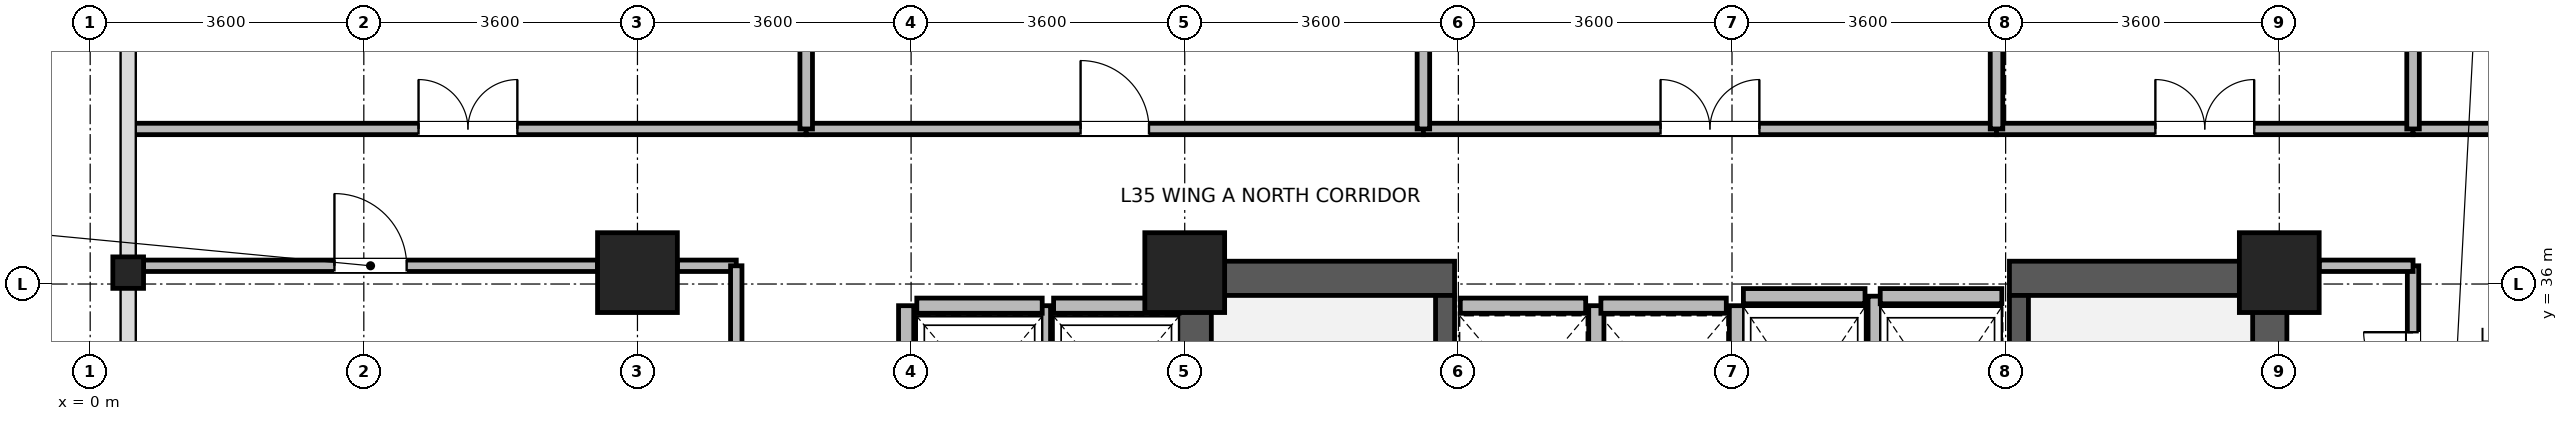
"""IFC4 building model, lengths in metres.
Left out: names, types, materials, properties, quantities, classifications, styles, units other than length and angle.
Written with IfcOpenShell. Run it as: python <this file> out.ifc"""

import sys

from ifc_helpers import new_model, si_unit, direction, frame, frame_2d, origin, origin_2d, place, context, subcontext, project, spatial, rectangle, i_section, extrude, source, transform, mapped, element, fill, save


model = new_model("IFC4")
c1 = context("Model", 3, precision=1e-05, world=origin(), true_north=direction((0.0, 1.0)))
c2 = subcontext(c1, "Body", "Model", "MODEL_VIEW")
j1 = project(units=[si_unit("LENGTHUNIT", "METRE"), si_unit("PLANEANGLEUNIT", "RADIAN")], contexts=[c1])
p1 = place(None, origin())
s1 = spatial("IfcSite", under=j1, at=p1, CompositionType="ELEMENT")
p2 = place(p1, origin())
s2 = spatial("IfcBuilding", under=s1, at=p2, CompositionType="ELEMENT")
p3 = place(p2, frame((0.0, 0.0, 140.2)))
s3 = spatial("IfcBuildingStorey", under=s2, at=p3, CompositionType="ELEMENT", Elevation=140.2)
for number, where, z_axis, x_axis in (
    (1, (14.525, 28.4, 0.0), (0.0, 0.0, 1.0), (0.0, 1.0, 0.0)),
    (2, (28.675, 28.4, 0.0), (0.0, 0.0, 1.0), (0.0, 1.0, 0.0)),
):
    element("IfcWall", number, at=place(p3, frame(where, z_axis=z_axis, x_axis=x_axis)), inside=s3, PredefinedType="SHEAR", context=c2, shape_type="SweptSolid", body=[
        extrude(rectangle(XDim=7.9, YDim=0.45, at=frame_2d((3.95, 0.0))), origin(), (0.0, 0.0, 1.0), 3.46),
    ])
for number, where, z_axis, x_axis in (
    (3, (14.75, 36.075, 0.0), (0.0, 0.0, 1.0), (1.0, 0.0, 0.0)),
    (4, (25.25, 36.075, 0.0), (0.0, 0.0, 1.0), (1.0, 0.0, 0.0)),
):
    element("IfcWall", number, at=place(p3, frame(where, z_axis=z_axis, x_axis=x_axis)), inside=s3, PredefinedType="SHEAR", context=c2, shape_type="SweptSolid", body=[
        extrude(rectangle(XDim=3.2, YDim=0.45, at=frame_2d((1.6, 0.0))), origin(), (0.0, 0.0, 1.0), 3.46),
    ])
p4 = place(p3, frame((17.825, 28.85, 0.0), z_axis=(0.0, 0.0, 1.0), x_axis=(0.0, 1.0, 0.0)))
e5 = element("IfcWall", 5, at=p4, inside=s3, PredefinedType="SHEAR", context=c2, shape_type="SweptSolid", body=[
    extrude(rectangle(XDim=7.0, YDim=0.25, at=frame_2d((3.5, 0.0))), origin(), (0.0, 0.0, 1.0), 3.46),
])
p5 = place(p4, frame((0.15, 0.0, 0.0)))
e6 = element("IfcOpeningElement", 6, at=p5, cuts=e5, PredefinedType="OPENING", context=c2, shape_type="SweptSolid", body=[
    extrude(rectangle(XDim=1.1, YDim=2.08, at=frame_2d((0.55, 1.04))), frame((0.0, 0.135, 0.0), z_axis=(0.0, -1.0, 0.0), x_axis=(1.0, 0.0, 0.0)), (0.0, 0.0, 1.0), 0.27),
])
p6 = place(p3, frame((25.375, 28.85, 0.0), z_axis=(0.0, 0.0, 1.0), x_axis=(0.0, 1.0, 0.0)))
e7 = element("IfcWall", 7, at=p6, inside=s3, PredefinedType="SHEAR", context=c2, shape_type="SweptSolid", body=[
    extrude(rectangle(XDim=7.0, YDim=0.25, at=frame_2d((3.5, 0.0))), origin(), (0.0, 0.0, 1.0), 3.46),
])
p7 = place(p6, frame((0.15, 0.0, 0.0)))
e8 = element("IfcOpeningElement", 8, at=p7, cuts=e7, PredefinedType="OPENING", context=c2, shape_type="SweptSolid", body=[
    extrude(rectangle(XDim=1.1, YDim=2.08, at=frame_2d((0.55, 1.04))), frame((0.0, 0.135, 0.0), z_axis=(0.0, -1.0, 0.0), x_axis=(1.0, 0.0, 0.0)), (0.0, 0.0, 1.0), 0.27),
])
m1 = source(origin(), c2, "Body", "SweptSolid", [
    extrude(rectangle(XDim=1.05, YDim=1.05, at=origin_2d()), origin(), (0.0, 0.0, 1.0), 3.7),
])
for number, where, z_axis, x_axis in (
    (9, (7.2, 36.15, 0.0), (0.0, 0.0, 1.0), (1.0, 0.0, 0.0)),
    (10, (14.4, 36.15, 0.0), (0.0, 0.0, 1.0), (1.0, 0.0, 0.0)),
    (11, (28.8, 36.15, 0.0), (0.0, 0.0, 1.0), (1.0, 0.0, 0.0)),
):
    element("IfcColumn", number, at=place(p3, frame(where, z_axis=z_axis, x_axis=x_axis)), inside=s3, PredefinedType="COLUMN", context=c2, shape_type="MappedRepresentation", body=[
        mapped(m1, transform((0.0, 0.0, 0.0), x_axis=(1.0, 0.0, 0.0), y_axis=(0.0, 1.0, 0.0), z_axis=(0.0, 0.0, 1.0), scale=1.0)),
    ])
m2 = source(origin(), c2, "Body", "SweptSolid", [
    extrude(i_section(OverallWidth=0.404, OverallDepth=0.414, WebThickness=0.021, FlangeThickness=0.028, FilletRadius=0.015, at=origin_2d()), origin(), (0.0, 0.0, 1.0), 3.7),
])
p8 = place(p3, frame((0.5, 36.15, 0.0), z_axis=(0.0, 0.0, 1.0), x_axis=(1.0, 0.0, 0.0)))
e12 = element("IfcColumn", 12, at=p8, inside=s3, PredefinedType="COLUMN", context=c2, shape_type="MappedRepresentation", body=[
    mapped(m2, transform((0.0, 0.0, 0.0), x_axis=(1.0, 0.0, 0.0), y_axis=(0.0, 1.0, 0.0), z_axis=(0.0, 0.0, 1.0), scale=1.0)),
])
p9 = place(p3, frame((18.025, 35.715, 0.0), z_axis=(0.0, 0.0, 1.0), x_axis=(1.0, 0.0, 0.0)))
e13 = element("IfcWall", 13, at=p9, inside=s3, PredefinedType="PARTITIONING", context=c2, shape_type="SweptSolid", body=[
    extrude(rectangle(XDim=1.65, YDim=0.2, at=frame_2d((0.825, 0.0))), origin(), (0.0, 0.0, 1.0), 2.44),
])
p10 = place(p3, frame((19.815, 33.485, 0.0), z_axis=(0.0, 0.0, 1.0), x_axis=(0.0, 1.0, 0.0)))
e14 = element("IfcWall", 14, at=p10, inside=s3, PredefinedType="PARTITIONING", context=c2, shape_type="SweptSolid", body=[
    extrude(rectangle(XDim=2.23, YDim=0.2, at=frame_2d((1.115, 0.0))), origin(), (0.0, 0.0, 1.0), 3.44),
])
p11 = place(p3, frame((19.875, 35.715, 0.0), z_axis=(0.0, 0.0, 1.0), x_axis=(1.0, 0.0, 0.0)))
e15 = element("IfcWall", 15, at=p11, inside=s3, PredefinedType="PARTITIONING", context=c2, shape_type="SweptSolid", body=[
    extrude(rectangle(XDim=1.65, YDim=0.2, at=frame_2d((0.825, 0.0))), origin(), (0.0, 0.0, 1.0), 2.44),
])
p12 = place(p3, frame((21.665, 33.485, 0.0), z_axis=(0.0, 0.0, 1.0), x_axis=(0.0, 1.0, 0.0)))
e16 = element("IfcWall", 16, at=p12, inside=s3, PredefinedType="PARTITIONING", context=c2, shape_type="SweptSolid", body=[
    extrude(rectangle(XDim=2.23, YDim=0.2, at=frame_2d((1.115, 0.0))), origin(), (0.0, 0.0, 1.0), 3.44),
])
p13 = place(p3, frame((12.675, 35.715, 0.0), z_axis=(0.0, 0.0, 1.0), x_axis=(1.0, 0.0, 0.0)))
e17 = element("IfcWall", 17, at=p13, inside=s3, PredefinedType="PARTITIONING", context=c2, shape_type="SweptSolid", body=[
    extrude(rectangle(XDim=1.65, YDim=0.2, at=frame_2d((0.825, 0.0))), origin(), (0.0, 0.0, 1.0), 3.44),
])
p14 = place(p3, frame((12.535, 33.485, 0.0), z_axis=(0.0, 0.0, 1.0), x_axis=(0.0, 1.0, 0.0)))
e18 = element("IfcWall", 18, at=p14, inside=s3, PredefinedType="PARTITIONING", context=c2, shape_type="SweptSolid", body=[
    extrude(rectangle(XDim=2.23, YDim=0.2, at=frame_2d((1.115, 0.0))), origin(), (0.0, 0.0, 1.0), 3.44),
])
p15 = place(p3, frame((10.875, 35.715, 0.0), z_axis=(0.0, 0.0, 1.0), x_axis=(1.0, 0.0, 0.0)))
e19 = element("IfcWall", 19, at=p15, inside=s3, PredefinedType="PARTITIONING", context=c2, shape_type="SweptSolid", body=[
    extrude(rectangle(XDim=1.65, YDim=0.2, at=frame_2d((0.825, 0.0))), origin(), (0.0, 0.0, 1.0), 3.44),
])
p16 = place(p3, frame((10.735, 33.485, 0.0), z_axis=(0.0, 0.0, 1.0), x_axis=(0.0, 1.0, 0.0)))
e20 = element("IfcWall", 20, at=p16, inside=s3, PredefinedType="PARTITIONING", context=c2, shape_type="SweptSolid", body=[
    extrude(rectangle(XDim=2.23, YDim=0.2, at=frame_2d((1.115, 0.0))), origin(), (0.0, 0.0, 1.0), 3.44),
])
p17 = place(p3, frame((21.75, 35.84, 0.0), z_axis=(0.0, 0.0, 1.0), x_axis=(1.0, 0.0, 0.0)))
e21 = element("IfcWall", 21, at=p17, inside=s3, PredefinedType="PARTITIONING", context=c2, shape_type="SweptSolid", body=[
    extrude(rectangle(XDim=1.6, YDim=0.2, at=frame_2d((0.8, 0.0))), origin(), (0.0, 0.0, 1.0), 2.44),
])
p18 = place(p3, frame((23.49, 33.16, 0.0), z_axis=(0.0, 0.0, 1.0), x_axis=(0.0, 1.0, 0.0)))
e22 = element("IfcWall", 22, at=p18, inside=s3, PredefinedType="PARTITIONING", context=c2, shape_type="SweptSolid", body=[
    extrude(rectangle(XDim=2.68, YDim=0.2, at=frame_2d((1.34, 0.0))), origin(), (0.0, 0.0, 1.0), 3.44),
])
p19 = place(p3, frame((23.55, 35.84, 0.0), z_axis=(0.0, 0.0, 1.0), x_axis=(1.0, 0.0, 0.0)))
e23 = element("IfcWall", 23, at=p19, inside=s3, PredefinedType="PARTITIONING", context=c2, shape_type="SweptSolid", body=[
    extrude(rectangle(XDim=1.6, YDim=0.2, at=frame_2d((0.8, 0.0))), origin(), (0.0, 0.0, 1.0), 2.44),
])
p20 = place(p3, frame((0.52, 38.04, 0.0), z_axis=(0.0, 0.0, 1.0), x_axis=(1.0, 0.0, 0.0)))
e24 = element("IfcWall", 24, at=p20, inside=s3, PredefinedType="PARTITIONING", context=c2, shape_type="SweptSolid", body=[
    extrude(rectangle(XDim=8.9, YDim=0.15, at=frame_2d((4.45, 0.0))), origin(), (0.0, 0.0, 1.0), 3.44),
])
p21 = place(p20, frame((3.8, 0.0, 0.0)))
e25 = element("IfcOpeningElement", 25, at=p21, cuts=e24, PredefinedType="OPENING", context=c2, shape_type="SweptSolid", body=[
    extrude(rectangle(XDim=1.3, YDim=2.12, at=frame_2d((0.65, 1.06))), frame((0.0, 0.085, 0.0), z_axis=(0.0, -1.0, 0.0), x_axis=(1.0, 0.0, 0.0)), (0.0, 0.0, 1.0), 0.17),
])
p22 = place(p3, frame((9.42, 38.04, 0.0), z_axis=(0.0, 0.0, 1.0), x_axis=(1.0, 0.0, 0.0)))
e26 = element("IfcWall", 26, at=p22, inside=s3, PredefinedType="PARTITIONING", context=c2, shape_type="SweptSolid", body=[
    extrude(rectangle(XDim=8.12, YDim=0.15, at=frame_2d((4.06, 0.0))), origin(), (0.0, 0.0, 1.0), 3.44),
])
p23 = place(p22, frame((3.61, 0.0, 0.0)))
e27 = element("IfcOpeningElement", 27, at=p23, cuts=e26, PredefinedType="OPENING", context=c2, shape_type="SweptSolid", body=[
    extrude(rectangle(XDim=0.9, YDim=2.08, at=frame_2d((0.45, 1.04))), frame((0.0, 0.085, 0.0), z_axis=(0.0, -1.0, 0.0), x_axis=(1.0, 0.0, 0.0)), (0.0, 0.0, 1.0), 0.17),
])
p24 = place(p3, frame((0.702, 36.24, 0.0), z_axis=(0.0, 0.0, 1.0), x_axis=(1.0, 0.0, 0.0)))
e28 = element("IfcWall", 28, at=p24, inside=s3, PredefinedType="PARTITIONING", context=c2, shape_type="SweptSolid", body=[
    extrude(rectangle(XDim=5.973, YDim=0.15, at=frame_2d((2.987, 0.0))), origin(), (0.0, 0.0, 1.0), 2.84),
])
p25 = place(p24, frame((2.511, 0.0, 0.0)))
e29 = element("IfcOpeningElement", 29, at=p25, cuts=e28, PredefinedType="OPENING", context=c2, shape_type="SweptSolid", body=[
    extrude(rectangle(XDim=0.95, YDim=2.1, at=frame_2d((0.475, 1.05))), frame((0.0, 0.085, 0.0), z_axis=(0.0, -1.0, 0.0), x_axis=(1.0, 0.0, 0.0)), (0.0, 0.0, 1.0), 0.17),
])
p26 = place(p3, frame((7.725, 36.24, 0.0), z_axis=(0.0, 0.0, 1.0), x_axis=(1.0, 0.0, 0.0)))
e30 = element("IfcWall", 30, at=p26, inside=s3, PredefinedType="PARTITIONING", context=c2, shape_type="SweptSolid", body=[
    extrude(rectangle(XDim=0.775, YDim=0.15, at=frame_2d((0.387, 0.0))), origin(), (0.0, 0.0, 1.0), 2.84),
])
p27 = place(p3, frame((17.54, 38.04, 0.0), z_axis=(0.0, 0.0, 1.0), x_axis=(1.0, 0.0, 0.0)))
e31 = element("IfcWall", 31, at=p27, inside=s3, PredefinedType="PARTITIONING", context=c2, shape_type="SweptSolid", body=[
    extrude(rectangle(XDim=7.54, YDim=0.15, at=frame_2d((3.77, 0.0))), origin(), (0.0, 0.0, 1.0), 3.44),
])
p28 = place(p27, frame((3.12, 0.0, 0.0)))
e32 = element("IfcOpeningElement", 32, at=p28, cuts=e31, PredefinedType="OPENING", context=c2, shape_type="SweptSolid", body=[
    extrude(rectangle(XDim=1.3, YDim=2.12, at=frame_2d((0.65, 1.06))), frame((0.0, 0.085, 0.0), z_axis=(0.0, -1.0, 0.0), x_axis=(1.0, 0.0, 0.0)), (0.0, 0.0, 1.0), 0.17),
])
p29 = place(p3, frame((25.08, 38.04, 0.0), z_axis=(0.0, 0.0, 1.0), x_axis=(1.0, 0.0, 0.0)))
e33 = element("IfcWall", 33, at=p29, inside=s3, PredefinedType="PARTITIONING", context=c2, shape_type="SweptSolid", body=[
    extrude(rectangle(XDim=5.48, YDim=0.15, at=frame_2d((2.74, 0.0))), origin(), (0.0, 0.0, 1.0), 3.44),
])
p30 = place(p29, frame((2.09, 0.0, 0.0)))
e34 = element("IfcOpeningElement", 34, at=p30, cuts=e33, PredefinedType="OPENING", context=c2, shape_type="SweptSolid", body=[
    extrude(rectangle(XDim=1.3, YDim=2.12, at=frame_2d((0.65, 1.06))), frame((0.0, 0.085, 0.0), z_axis=(0.0, -1.0, 0.0), x_axis=(1.0, 0.0, 0.0)), (0.0, 0.0, 1.0), 0.17),
])
p31 = place(p3, frame((30.56, 38.04, 0.0), z_axis=(0.0, 0.0, 1.0), x_axis=(1.0, 0.0, 0.0)))
e35 = element("IfcWall", 35, at=p31, inside=s3, PredefinedType="PARTITIONING", context=c2, shape_type="SweptSolid", body=[
    extrude(rectangle(XDim=4.8, YDim=0.15, at=frame_2d((2.4, 0.0))), origin(), (0.0, 0.0, 1.0), 3.44),
])
p32 = place(p31, frame((1.75, 0.0, 0.0)))
e36 = element("IfcOpeningElement", 36, at=p32, cuts=e35, PredefinedType="OPENING", context=c2, shape_type="SweptSolid", body=[
    extrude(rectangle(XDim=1.3, YDim=2.12, at=frame_2d((0.65, 1.06))), frame((0.0, 0.085, 0.0), z_axis=(0.0, -1.0, 0.0), x_axis=(1.0, 0.0, 0.0)), (0.0, 0.0, 1.0), 0.17),
])
p33 = place(p3, frame((8.5, 32.4, 0.0), z_axis=(0.0, 0.0, 1.0), x_axis=(0.0, 1.0, 0.0)))
e37 = element("IfcWall", 37, at=p33, inside=s3, PredefinedType="PARTITIONING", context=c2, shape_type="SweptSolid", body=[
    extrude(rectangle(XDim=3.84, YDim=0.15, at=frame_2d((1.92, 0.0))), origin(), (0.0, 0.0, 1.0), 3.44),
])
p34 = place(p3, frame((30.56, 33.7, 0.0), z_axis=(0.0, 0.0, 1.0), x_axis=(0.0, 1.0, 0.0)))
e38 = element("IfcWall", 38, at=p34, inside=s3, PredefinedType="PARTITIONING", context=c2, shape_type="SweptSolid", body=[
    extrude(rectangle(XDim=2.54, YDim=0.15, at=frame_2d((1.27, 0.0))), origin(), (0.0, 0.0, 1.0), 3.44),
])
p35 = place(p34, frame((0.366, 0.0, 0.0)))
e39 = element("IfcOpeningElement", 39, at=p35, cuts=e38, PredefinedType="OPENING", context=c2, shape_type="SweptSolid", body=[
    extrude(rectangle(XDim=1.3, YDim=2.12, at=frame_2d((0.65, 1.06))), frame((0.0, 0.085, 0.0), z_axis=(0.0, -1.0, 0.0), x_axis=(1.0, 0.0, 0.0)), (0.0, 0.0, 1.0), 0.17),
])
p36 = place(p3, frame((29.325, 36.24, 0.0), z_axis=(0.0, 0.0, 1.0), x_axis=(1.0, 0.0, 0.0)))
e40 = element("IfcWall", 40, at=p36, inside=s3, PredefinedType="PARTITIONING", context=c2, shape_type="SweptSolid", body=[
    extrude(rectangle(XDim=1.235, YDim=0.15, at=frame_2d((0.618, 0.0))), origin(), (0.0, 0.0, 1.0), 2.84),
])
for number, where, z_axis, x_axis in (
    (41, (9.42, 38.04, 0.0), (0.0, 0.0, 1.0), (0.0, 1.0, 0.0)),
    (42, (17.54, 38.04, 0.0), (0.0, 0.0, 1.0), (0.0, 1.0, 0.0)),
):
    element("IfcWall", number, at=place(p3, frame(where, z_axis=z_axis, x_axis=x_axis)), inside=s3, PredefinedType="PARTITIONING", context=c2, shape_type="SweptSolid", body=[
        extrude(rectangle(XDim=5.028, YDim=0.165, at=frame_2d((2.514, 0.0))), origin(), (0.0, 0.0, 1.0), 3.44),
    ])
p37 = place(p3, frame((25.08, 38.04, 0.0), z_axis=(0.0, 0.0, 1.0), x_axis=(0.0, 1.0, 0.0)))
e43 = element("IfcWall", 43, at=p37, inside=s3, PredefinedType="PARTITIONING", context=c2, shape_type="SweptSolid", body=[
    extrude(rectangle(XDim=5.028, YDim=0.165, at=frame_2d((2.514, 0.0))), origin(), (0.0, 0.0, 1.0), 3.11),
])
p38 = place(p3, frame((30.56, 38.04, 0.0), z_axis=(0.0, 0.0, 1.0), x_axis=(0.0, 1.0, 0.0)))
e44 = element("IfcWall", 44, at=p38, inside=s3, PredefinedType="PARTITIONING", context=c2, shape_type="SweptSolid", body=[
    extrude(rectangle(XDim=5.028, YDim=0.165, at=frame_2d((2.514, 0.0))), origin(), (0.0, 0.0, 1.0), 3.44),
])
p39 = place(p21, origin())
e45 = element("IfcDoor", 45, at=p39, inside=s3, OperationType="DOUBLE_DOOR_SINGLE_SWING", PredefinedType="DOOR", context=c2, shape_type="SweptSolid", body=[
    extrude(rectangle(XDim=1.3, YDim=2.12, at=frame_2d((0.65, 1.06))), frame((0.0, 0.025, 0.0), z_axis=(0.0, -1.0, 0.0), x_axis=(1.0, 0.0, 0.0)), (0.0, 0.0, 1.0), 0.05),
])
fill(e25, e45)
p40 = place(p23, origin())
e46 = element("IfcDoor", 46, at=p40, inside=s3, OperationType="SINGLE_SWING_LEFT", PredefinedType="DOOR", context=c2, shape_type="SweptSolid", body=[
    extrude(rectangle(XDim=0.9, YDim=2.08, at=frame_2d((0.45, 1.04))), frame((0.0, 0.025, 0.0), z_axis=(0.0, -1.0, 0.0), x_axis=(1.0, 0.0, 0.0)), (0.0, 0.0, 1.0), 0.05),
])
fill(e27, e46)
p41 = place(p25, origin())
e47 = element("IfcDoor", 47, at=p41, inside=s3, OperationType="SINGLE_SWING_LEFT", PredefinedType="DOOR", context=c2, shape_type="SweptSolid", body=[
    extrude(rectangle(XDim=0.95, YDim=2.1, at=frame_2d((0.475, 1.05))), frame((0.0, 0.025, 0.0), z_axis=(0.0, -1.0, 0.0), x_axis=(1.0, 0.0, 0.0)), (0.0, 0.0, 1.0), 0.05),
])
fill(e29, e47)
p42 = place(p28, origin())
e48 = element("IfcDoor", 48, at=p42, inside=s3, OperationType="DOUBLE_DOOR_SINGLE_SWING", PredefinedType="DOOR", context=c2, shape_type="SweptSolid", body=[
    extrude(rectangle(XDim=1.3, YDim=2.12, at=frame_2d((0.65, 1.06))), frame((0.0, 0.025, 0.0), z_axis=(0.0, -1.0, 0.0), x_axis=(1.0, 0.0, 0.0)), (0.0, 0.0, 1.0), 0.05),
])
fill(e32, e48)
p43 = place(p30, origin())
e49 = element("IfcDoor", 49, at=p43, inside=s3, OperationType="DOUBLE_DOOR_SINGLE_SWING", PredefinedType="DOOR", context=c2, shape_type="SweptSolid", body=[
    extrude(rectangle(XDim=1.3, YDim=2.12, at=frame_2d((0.65, 1.06))), frame((0.0, 0.025, 0.0), z_axis=(0.0, -1.0, 0.0), x_axis=(1.0, 0.0, 0.0)), (0.0, 0.0, 1.0), 0.05),
])
fill(e34, e49)
p44 = place(p35, origin())
e50 = element("IfcDoor", 50, at=p44, inside=s3, OperationType="DOUBLE_DOOR_SINGLE_SWING", PredefinedType="DOOR", context=c2, shape_type="SweptSolid", body=[
    extrude(rectangle(XDim=1.3, YDim=2.12, at=frame_2d((0.65, 1.06))), frame((0.0, 0.025, 0.0), z_axis=(0.0, -1.0, 0.0), x_axis=(1.0, 0.0, 0.0)), (0.0, 0.0, 1.0), 0.05),
])
fill(e39, e50)
save(model, sys.argv[1])
